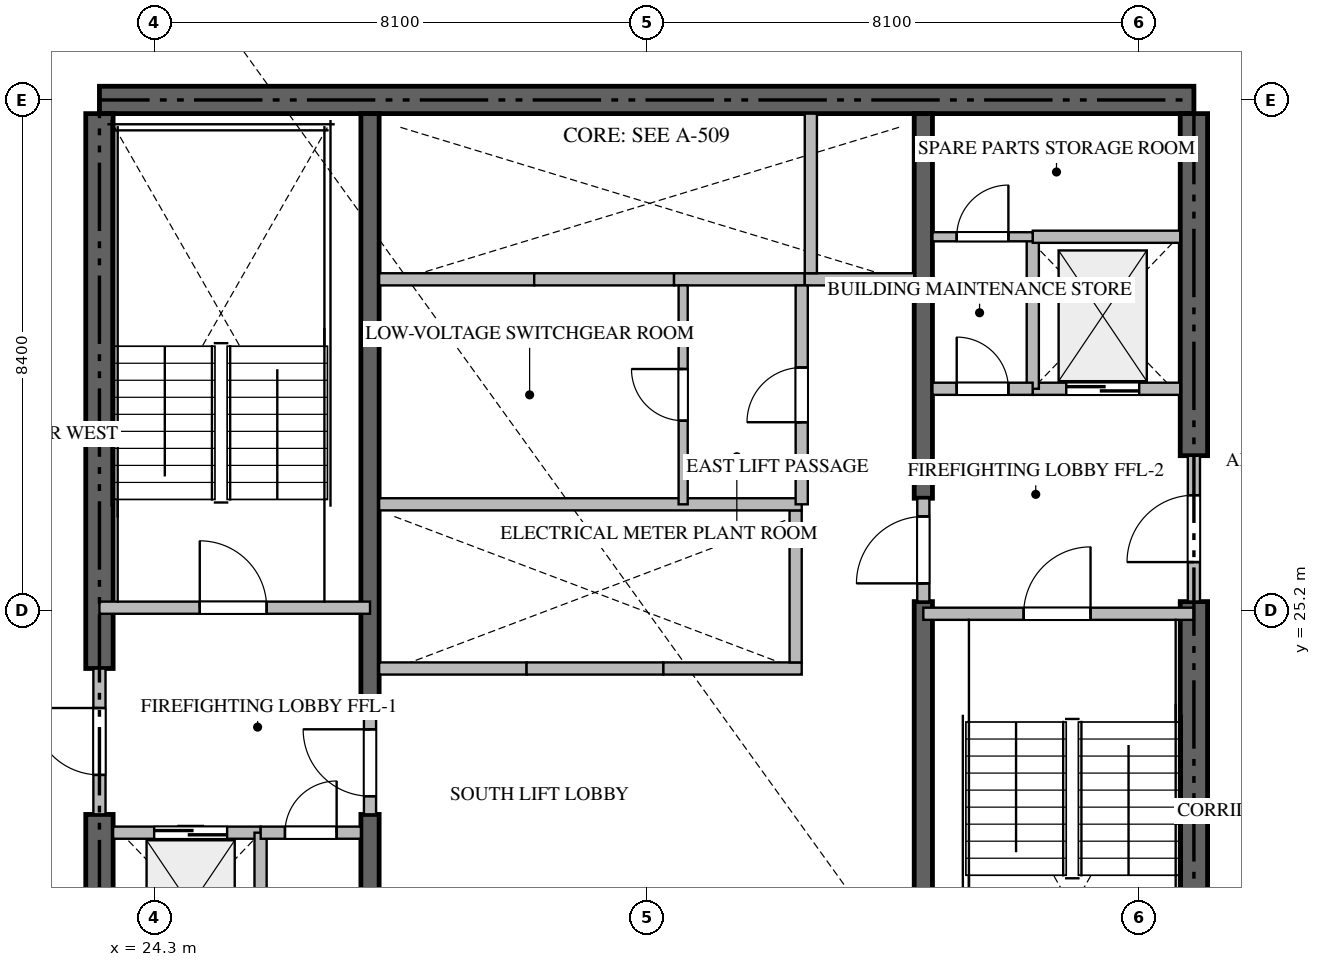
"""IFC4 building model, lengths in metres.
Left out: names, types, materials, properties, quantities, classifications, styles, units other than length and angle.
Written with IfcOpenShell. Run it as: python <this file> out.ifc"""

import sys

from ifc_helpers import new_model, si_unit, direction, frame, frame_2d, origin, place, context, subcontext, project, spatial, rectangle, extrude, source, transform, mapped, element, fill, save


model = new_model("IFC4")
c1 = context("Model", 3, precision=1e-05, world=origin(), true_north=direction((0.0, 1.0)))
c2 = subcontext(c1, "Body", "Model", "MODEL_VIEW")
j1 = project(units=[si_unit("LENGTHUNIT", "METRE"), si_unit("PLANEANGLEUNIT", "RADIAN")], contexts=[c1])
p1 = place(None, origin())
s1 = spatial("IfcSite", under=j1, at=p1, CompositionType="ELEMENT")
p2 = place(p1, origin())
s2 = spatial("IfcBuilding", under=s1, at=p2, CompositionType="ELEMENT")
p3 = place(p2, frame((0.0, 0.0, 64.2)))
s3 = spatial("IfcBuildingStorey", under=s2, at=p3, CompositionType="ELEMENT", Elevation=64.2)
p4 = place(p3, frame((41.4, 33.6, -0.26), z_axis=(0.0, 0.0, 1.0), x_axis=(-1.0, 0.0, 0.0)))
e1 = element("IfcWall", 1, at=p4, inside=s3, PredefinedType="SHEAR", context=c2, shape_type="SweptSolid", body=[
    extrude(rectangle(XDim=18.0, YDim=0.45, at=frame_2d((9.0, 0.0))), origin(), (0.0, 0.0, 1.0), 3.748),
])
p5 = place(p3, frame((23.4, 17.025, -0.26), z_axis=(0.0, 0.0, 1.0), x_axis=(0.0, 1.0, 0.0)))
e2 = element("IfcWall", 2, at=p5, inside=s3, PredefinedType="SHEAR", context=c2, shape_type="SweptSolid", body=[
    extrude(rectangle(XDim=4.825, YDim=0.45, at=frame_2d((2.413, 0.0))), origin(), (0.0, 0.0, 1.0), 3.748),
])
p6 = place(p3, frame((23.4, 24.25, -0.26), z_axis=(0.0, 0.0, 1.0), x_axis=(0.0, 1.0, 0.0)))
e3 = element("IfcWall", 3, at=p6, inside=s3, PredefinedType="SHEAR", context=c2, shape_type="SweptSolid", body=[
    extrude(rectangle(XDim=9.125, YDim=0.45, at=frame_2d((4.562, 0.0))), origin(), (0.0, 0.0, 1.0), 3.748),
])
p7 = place(p3, frame((41.4, 17.025, -0.26), z_axis=(0.0, 0.0, 1.0), x_axis=(0.0, 1.0, 0.0)))
e4 = element("IfcWall", 4, at=p7, inside=s3, PredefinedType="SHEAR", context=c2, shape_type="SweptSolid", body=[
    extrude(rectangle(XDim=8.325, YDim=0.45, at=frame_2d((4.163, 0.0))), origin(), (0.0, 0.0, 1.0), 3.748),
])
p8 = place(p3, frame((41.4, 27.75, -0.26), z_axis=(0.0, 0.0, 1.0), x_axis=(0.0, 1.0, 0.0)))
e5 = element("IfcWall", 5, at=p8, inside=s3, PredefinedType="SHEAR", context=c2, shape_type="SweptSolid", body=[
    extrude(rectangle(XDim=5.625, YDim=0.45, at=frame_2d((2.812, 0.0))), origin(), (0.0, 0.0, 1.0), 3.748),
])
p9 = place(p3, frame((27.85, 17.025, -0.26), z_axis=(0.0, 0.0, 1.0), x_axis=(0.0, 1.0, 0.0)))
e6 = element("IfcWall", 6, at=p9, inside=s3, PredefinedType="SHEAR", context=c2, shape_type="SweptSolid", body=[
    extrude(rectangle(XDim=4.825, YDim=0.3, at=frame_2d((2.413, 0.0))), origin(), (0.0, 0.0, 1.0), 3.748),
])
p10 = place(p3, frame((27.85, 23.55, -0.26), z_axis=(0.0, 0.0, 1.0), x_axis=(0.0, 1.0, 0.0)))
e7 = element("IfcWall", 7, at=p10, inside=s3, PredefinedType="SHEAR", context=c2, shape_type="SweptSolid", body=[
    extrude(rectangle(XDim=9.825, YDim=0.3, at=frame_2d((4.913, 0.0))), origin(), (0.0, 0.0, 1.0), 3.748),
])
p11 = place(p3, frame((36.95, 17.025, -0.26), z_axis=(0.0, 0.0, 1.0), x_axis=(0.0, 1.0, 0.0)))
e8 = element("IfcWall", 8, at=p11, inside=s3, PredefinedType="SHEAR", context=c2, shape_type="SweptSolid", body=[
    extrude(rectangle(XDim=8.325, YDim=0.3, at=frame_2d((4.163, 0.0))), origin(), (0.0, 0.0, 1.0), 3.748),
])
p12 = place(p3, frame((36.95, 27.05, -0.26), z_axis=(0.0, 0.0, 1.0), x_axis=(0.0, 1.0, 0.0)))
e9 = element("IfcWall", 9, at=p12, inside=s3, PredefinedType="SHEAR", context=c2, shape_type="SweptSolid", body=[
    extrude(rectangle(XDim=6.325, YDim=0.3, at=frame_2d((3.163, 0.0))), origin(), (0.0, 0.0, 1.0), 3.748),
])
p13 = place(p3, frame((23.4, 25.25, 0.0), z_axis=(0.0, 0.0, 1.0), x_axis=(1.0, 0.0, 0.0)))
e10 = element("IfcWall", 10, at=p13, inside=s3, PredefinedType="STANDARD", context=c2, shape_type="SweptSolid", body=[
    extrude(rectangle(XDim=4.45, YDim=0.2, at=frame_2d((2.225, 0.0))), origin(), (0.0, 0.0, 1.0), 3.49),
])
p14 = place(p13, frame((1.65, 0.0, 0.0)))
e11 = element("IfcOpeningElement", 11, at=p14, cuts=e10, PredefinedType="OPENING", context=c2, shape_type="SweptSolid", body=[
    extrude(rectangle(XDim=1.1, YDim=2.15, at=frame_2d((0.55, 1.075))), frame((0.0, 0.11, 0.0), z_axis=(0.0, -1.0, 0.0), x_axis=(1.0, 0.0, 0.0)), (0.0, 0.0, 1.0), 0.22),
])
p15 = place(p3, frame((36.95, 25.15, 0.0), z_axis=(0.0, 0.0, 1.0), x_axis=(1.0, 0.0, 0.0)))
e12 = element("IfcWall", 12, at=p15, inside=s3, PredefinedType="STANDARD", context=c2, shape_type="SweptSolid", body=[
    extrude(rectangle(XDim=4.45, YDim=0.2, at=frame_2d((2.225, 0.0))), origin(), (0.0, 0.0, 1.0), 3.49),
])
p16 = place(p15, frame((1.65, 0.0, 0.0)))
e13 = element("IfcOpeningElement", 13, at=p16, cuts=e12, PredefinedType="OPENING", context=c2, shape_type="SweptSolid", body=[
    extrude(rectangle(XDim=1.1, YDim=2.15, at=frame_2d((0.55, 1.075))), frame((0.0, 0.11, 0.0), z_axis=(0.0, -1.0, 0.0), x_axis=(1.0, 0.0, 0.0)), (0.0, 0.0, 1.0), 0.22),
])
p17 = place(p3, frame((23.625, 21.55, 0.0), z_axis=(0.0, 0.0, 1.0), x_axis=(1.0, 0.0, 0.0)))
e14 = element("IfcWall", 14, at=p17, inside=s3, PredefinedType="STANDARD", context=c2, shape_type="SweptSolid", body=[
    extrude(rectangle(XDim=2.425, YDim=0.2, at=frame_2d((1.212, 0.0))), origin(), (0.0, 0.0, 1.0), 3.49),
])
p18 = place(p17, frame((0.675, 0.0, 0.0)))
e15 = element("IfcOpeningElement", 15, at=p18, cuts=e14, PredefinedType="OPENING", context=c2, shape_type="SweptSolid", body=[
    extrude(rectangle(XDim=1.2, YDim=2.2, at=frame_2d((0.6, 1.1))), frame((0.0, 0.11, 0.0), z_axis=(0.0, -1.0, 0.0), x_axis=(1.0, 0.0, 0.0)), (0.0, 0.0, 1.0), 0.22),
])
p19 = place(p3, frame((38.75, 28.85, 0.0), z_axis=(0.0, 0.0, 1.0), x_axis=(1.0, 0.0, 0.0)))
e16 = element("IfcWall", 16, at=p19, inside=s3, PredefinedType="STANDARD", context=c2, shape_type="SweptSolid", body=[
    extrude(rectangle(XDim=2.425, YDim=0.2, at=frame_2d((1.212, 0.0))), origin(), (0.0, 0.0, 1.0), 3.49),
])
p20 = place(p19, frame((0.55, 0.0, 0.0)))
e17 = element("IfcOpeningElement", 17, at=p20, cuts=e16, PredefinedType="OPENING", context=c2, shape_type="SweptSolid", body=[
    extrude(rectangle(XDim=1.2, YDim=2.2, at=frame_2d((0.6, 1.1))), frame((0.0, 0.11, 0.0), z_axis=(0.0, -1.0, 0.0), x_axis=(1.0, 0.0, 0.0)), (0.0, 0.0, 1.0), 0.22),
])
p21 = place(p3, frame((28.0, 24.25, 0.0), z_axis=(0.0, 0.0, 1.0), x_axis=(1.0, 0.0, 0.0)))
e18 = element("IfcWall", 18, at=p21, inside=s3, PredefinedType="STANDARD", context=c2, shape_type="SweptSolid", body=[
    extrude(rectangle(XDim=2.425, YDim=0.2, at=frame_2d((1.212, 0.0))), origin(), (0.0, 0.0, 1.0), 3.49),
])
p22 = place(p3, frame((30.425, 24.25, 0.0), z_axis=(0.0, 0.0, 1.0), x_axis=(1.0, 0.0, 0.0)))
e19 = element("IfcWall", 19, at=p22, inside=s3, PredefinedType="STANDARD", context=c2, shape_type="SweptSolid", body=[
    extrude(rectangle(XDim=2.25, YDim=0.2, at=frame_2d((1.125, 0.0))), origin(), (0.0, 0.0, 1.0), 3.49),
])
p23 = place(p3, frame((32.675, 24.25, 0.0), z_axis=(0.0, 0.0, 1.0), x_axis=(1.0, 0.0, 0.0)))
e20 = element("IfcWall", 20, at=p23, inside=s3, PredefinedType="STANDARD", context=c2, shape_type="SweptSolid", body=[
    extrude(rectangle(XDim=2.275, YDim=0.2, at=frame_2d((1.137, 0.0))), origin(), (0.0, 0.0, 1.0), 3.49),
])
p24 = place(p3, frame((34.85, 24.35, 0.0), z_axis=(0.0, 0.0, 1.0), x_axis=(0.0, 1.0, 0.0)))
e21 = element("IfcWall", 21, at=p24, inside=s3, PredefinedType="STANDARD", context=c2, shape_type="SweptSolid", body=[
    extrude(rectangle(XDim=2.5, YDim=0.2, at=frame_2d((1.25, 0.0))), origin(), (0.0, 0.0, 1.0), 3.49),
])
p25 = place(p3, frame((28.0, 30.65, 0.0), z_axis=(0.0, 0.0, 1.0), x_axis=(1.0, 0.0, 0.0)))
e22 = element("IfcWall", 22, at=p25, inside=s3, PredefinedType="STANDARD", context=c2, shape_type="SweptSolid", body=[
    extrude(rectangle(XDim=2.55, YDim=0.2, at=frame_2d((1.275, 0.0))), origin(), (0.0, 0.0, 1.0), 3.49),
])
p26 = place(p3, frame((30.55, 30.65, 0.0), z_axis=(0.0, 0.0, 1.0), x_axis=(1.0, 0.0, 0.0)))
e23 = element("IfcWall", 23, at=p26, inside=s3, PredefinedType="STANDARD", context=c2, shape_type="SweptSolid", body=[
    extrude(rectangle(XDim=2.3, YDim=0.2, at=frame_2d((1.15, 0.0))), origin(), (0.0, 0.0, 1.0), 3.49),
])
p27 = place(p3, frame((32.85, 30.65, 0.0), z_axis=(0.0, 0.0, 1.0), x_axis=(1.0, 0.0, 0.0)))
e24 = element("IfcWall", 24, at=p27, inside=s3, PredefinedType="STANDARD", context=c2, shape_type="SweptSolid", body=[
    extrude(rectangle(XDim=2.15, YDim=0.2, at=frame_2d((1.075, 0.0))), origin(), (0.0, 0.0, 1.0), 3.49),
])
p28 = place(p3, frame((35.0, 30.65, 0.0), z_axis=(0.0, 0.0, 1.0), x_axis=(1.0, 0.0, 0.0)))
e25 = element("IfcWall", 25, at=p28, inside=s3, PredefinedType="STANDARD", context=c2, shape_type="SweptSolid", body=[
    extrude(rectangle(XDim=1.8, YDim=0.2, at=frame_2d((0.9, 0.0))), origin(), (0.0, 0.0, 1.0), 3.49),
])
p29 = place(p3, frame((35.1, 30.75, 0.0), z_axis=(0.0, 0.0, 1.0), x_axis=(0.0, 1.0, 0.0)))
e26 = element("IfcWall", 26, at=p29, inside=s3, PredefinedType="STANDARD", context=c2, shape_type="SweptSolid", body=[
    extrude(rectangle(XDim=2.625, YDim=0.2, at=frame_2d((1.312, 0.0))), origin(), (0.0, 0.0, 1.0), 3.49),
])
p30 = place(p3, frame((26.05, 19.05, 0.0), z_axis=(0.0, 0.0, 1.0), x_axis=(0.0, 1.0, 0.0)))
e27 = element("IfcWall", 27, at=p30, inside=s3, PredefinedType="STANDARD", context=c2, shape_type="SweptSolid", body=[
    extrude(rectangle(XDim=2.5, YDim=0.2, at=frame_2d((1.25, 0.0))), origin(), (0.0, 0.0, 1.0), 3.49),
])
p31 = place(p3, frame((26.052, 21.55, 0.0), z_axis=(0.0, 0.0, 1.0), x_axis=(1.0, 0.0, 0.0)))
e28 = element("IfcWall", 28, at=p31, inside=s3, PredefinedType="STANDARD", context=c2, shape_type="SweptSolid", body=[
    extrude(rectangle(XDim=1.648, YDim=0.2, at=frame_2d((0.824, 0.0))), origin(), (0.0, 0.0, 1.0), 3.49),
])
p32 = place(p31, frame((0.399, 0.0, 0.0)))
e29 = element("IfcOpeningElement", 29, at=p32, cuts=e28, PredefinedType="OPENING", context=c2, shape_type="SweptSolid", body=[
    extrude(rectangle(XDim=0.85, YDim=2.1, at=frame_2d((0.425, 1.05))), frame((0.0, 0.11, 0.0), z_axis=(0.0, -1.0, 0.0), x_axis=(1.0, 0.0, 0.0)), (0.0, 0.0, 1.0), 0.22),
])
p33 = place(p3, frame((38.75, 28.85, 0.0), z_axis=(0.0, 0.0, 1.0), x_axis=(0.0, 1.0, 0.0)))
e30 = element("IfcWall", 30, at=p33, inside=s3, PredefinedType="STANDARD", context=c2, shape_type="SweptSolid", body=[
    extrude(rectangle(XDim=2.5, YDim=0.2, at=frame_2d((1.25, 0.0))), origin(), (0.0, 0.0, 1.0), 3.49),
])
p34 = place(p3, frame((38.75, 31.35, 0.0), z_axis=(0.0, 0.0, 1.0), x_axis=(1.0, 0.0, 0.0)))
e31 = element("IfcWall", 31, at=p34, inside=s3, PredefinedType="STANDARD", context=c2, shape_type="SweptSolid", body=[
    extrude(rectangle(XDim=2.425, YDim=0.2, at=frame_2d((1.212, 0.0))), origin(), (0.0, 0.0, 1.0), 3.49),
])
p35 = place(p3, frame((37.1, 28.85, 0.0), z_axis=(0.0, 0.0, 1.0), x_axis=(1.0, 0.0, 0.0)))
e32 = element("IfcWall", 32, at=p35, inside=s3, PredefinedType="STANDARD", context=c2, shape_type="SweptSolid", body=[
    extrude(rectangle(XDim=1.648, YDim=0.2, at=frame_2d((0.824, 0.0))), origin(), (0.0, 0.0, 1.0), 3.49),
])
p36 = place(p35, frame((0.399, 0.0, 0.0)))
e33 = element("IfcOpeningElement", 33, at=p36, cuts=e32, PredefinedType="OPENING", context=c2, shape_type="SweptSolid", body=[
    extrude(rectangle(XDim=0.85, YDim=2.1, at=frame_2d((0.425, 1.05))), frame((0.0, 0.11, 0.0), z_axis=(0.0, -1.0, 0.0), x_axis=(1.0, 0.0, 0.0)), (0.0, 0.0, 1.0), 0.22),
])
p37 = place(p3, frame((23.4, 21.852, 0.0), z_axis=(0.0, 0.0, 1.0), x_axis=(0.0, 1.0, 0.0)))
e34 = element("IfcWall", 34, at=p37, inside=s3, PredefinedType="STANDARD", context=c2, shape_type="SweptSolid", body=[
    extrude(rectangle(XDim=2.396, YDim=0.2, at=frame_2d((1.198, 0.0))), origin(), (0.0, 0.0, 1.0), 3.49),
])
p38 = place(p37, frame((0.648, 0.0, 0.0)))
e35 = element("IfcOpeningElement", 35, at=p38, cuts=e34, PredefinedType="OPENING", context=c2, shape_type="SweptSolid", body=[
    extrude(rectangle(XDim=1.1, YDim=2.15, at=frame_2d((0.55, 1.075))), frame((0.0, 0.11, 0.0), z_axis=(0.0, -1.0, 0.0), x_axis=(1.0, 0.0, 0.0)), (0.0, 0.0, 1.0), 0.22),
])
p39 = place(p3, frame((41.4, 25.352, 0.0), z_axis=(0.0, 0.0, 1.0), x_axis=(0.0, 1.0, 0.0)))
e36 = element("IfcWall", 36, at=p39, inside=s3, PredefinedType="STANDARD", context=c2, shape_type="SweptSolid", body=[
    extrude(rectangle(XDim=2.396, YDim=0.2, at=frame_2d((1.198, 0.0))), origin(), (0.0, 0.0, 1.0), 3.49),
])
p40 = place(p39, frame((0.648, 0.0, 0.0)))
e37 = element("IfcOpeningElement", 37, at=p40, cuts=e36, PredefinedType="OPENING", context=c2, shape_type="SweptSolid", body=[
    extrude(rectangle(XDim=1.1, YDim=2.15, at=frame_2d((0.55, 1.075))), frame((0.0, 0.11, 0.0), z_axis=(0.0, -1.0, 0.0), x_axis=(1.0, 0.0, 0.0)), (0.0, 0.0, 1.0), 0.22),
])
p41 = place(p3, frame((27.85, 21.852, 0.0), z_axis=(0.0, 0.0, 1.0), x_axis=(0.0, 1.0, 0.0)))
e38 = element("IfcWall", 38, at=p41, inside=s3, PredefinedType="STANDARD", context=c2, shape_type="SweptSolid", body=[
    extrude(rectangle(XDim=1.696, YDim=0.2, at=frame_2d((0.848, 0.0))), origin(), (0.0, 0.0, 1.0), 3.49),
])
p42 = place(p41, frame((0.298, 0.0, 0.0)))
e39 = element("IfcOpeningElement", 39, at=p42, cuts=e38, PredefinedType="OPENING", context=c2, shape_type="SweptSolid", body=[
    extrude(rectangle(XDim=1.1, YDim=2.15, at=frame_2d((0.55, 1.075))), frame((0.0, 0.11, 0.0), z_axis=(0.0, -1.0, 0.0), x_axis=(1.0, 0.0, 0.0)), (0.0, 0.0, 1.0), 0.22),
])
p43 = place(p3, frame((36.95, 25.352, 0.0), z_axis=(0.0, 0.0, 1.0), x_axis=(0.0, 1.0, 0.0)))
e40 = element("IfcWall", 40, at=p43, inside=s3, PredefinedType="STANDARD", context=c2, shape_type="SweptSolid", body=[
    extrude(rectangle(XDim=1.696, YDim=0.2, at=frame_2d((0.848, 0.0))), origin(), (0.0, 0.0, 1.0), 3.49),
])
p44 = place(p43, frame((0.298, 0.0, 0.0)))
e41 = element("IfcOpeningElement", 41, at=p44, cuts=e40, PredefinedType="OPENING", context=c2, shape_type="SweptSolid", body=[
    extrude(rectangle(XDim=1.1, YDim=2.15, at=frame_2d((0.55, 1.075))), frame((0.0, 0.11, 0.0), z_axis=(0.0, -1.0, 0.0), x_axis=(1.0, 0.0, 0.0)), (0.0, 0.0, 1.0), 0.22),
])
p45 = place(p3, frame((28.0, 26.95, 0.0), z_axis=(0.0, 0.0, 1.0), x_axis=(1.0, 0.0, 0.0)))
e42 = element("IfcWall", 42, at=p45, inside=s3, PredefinedType="STANDARD", context=c2, shape_type="SweptSolid", body=[
    extrude(rectangle(XDim=6.95, YDim=0.2, at=frame_2d((3.475, 0.0))), origin(), (0.0, 0.0, 1.0), 3.49),
])
p46 = place(p3, frame((37.1, 31.35, 0.0), z_axis=(0.0, 0.0, 1.0), x_axis=(1.0, 0.0, 0.0)))
e43 = element("IfcWall", 43, at=p46, inside=s3, PredefinedType="PARTITIONING", context=c2, shape_type="SweptSolid", body=[
    extrude(rectangle(XDim=1.648, YDim=0.15, at=frame_2d((0.824, 0.0))), origin(), (0.0, 0.0, 1.0), 3.49),
])
p47 = place(p46, frame((0.399, 0.0, 0.0)))
e44 = element("IfcOpeningElement", 44, at=p47, cuts=e43, PredefinedType="OPENING", context=c2, shape_type="SweptSolid", body=[
    extrude(rectangle(XDim=0.85, YDim=2.1, at=frame_2d((0.425, 1.05))), frame((0.0, 0.085, 0.0), z_axis=(0.0, -1.0, 0.0), x_axis=(1.0, 0.0, 0.0)), (0.0, 0.0, 1.0), 0.17),
])
p48 = place(p3, frame((34.95, 26.95, 0.0), z_axis=(0.0, 0.0, 1.0), x_axis=(0.0, 1.0, 0.0)))
e45 = element("IfcWall", 45, at=p48, inside=s3, PredefinedType="STANDARD", context=c2, shape_type="SweptSolid", body=[
    extrude(rectangle(XDim=3.6, YDim=0.2, at=frame_2d((1.8, 0.0))), origin(), (0.0, 0.0, 1.0), 3.49),
])
p49 = place(p48, frame((1.35, 0.0, 0.0)))
e46 = element("IfcOpeningElement", 46, at=p49, cuts=e45, PredefinedType="OPENING", context=c2, shape_type="SweptSolid", body=[
    extrude(rectangle(XDim=0.9, YDim=2.1, at=frame_2d((0.45, 1.05))), frame((0.0, 0.11, 0.0), z_axis=(0.0, -1.0, 0.0), x_axis=(1.0, 0.0, 0.0)), (0.0, 0.0, 1.0), 0.22),
])
p50 = place(p3, frame((33.0, 26.95, 0.0), z_axis=(0.0, 0.0, 1.0), x_axis=(0.0, 1.0, 0.0)))
e47 = element("IfcWall", 47, at=p50, inside=s3, PredefinedType="PARTITIONING", context=c2, shape_type="SweptSolid", body=[
    extrude(rectangle(XDim=3.6, YDim=0.15, at=frame_2d((1.8, 0.0))), origin(), (0.0, 0.0, 1.0), 3.49),
])
p51 = place(p50, frame((1.375, 0.0, 0.0)))
e48 = element("IfcOpeningElement", 48, at=p51, cuts=e47, PredefinedType="OPENING", context=c2, shape_type="SweptSolid", body=[
    extrude(rectangle(XDim=0.85, YDim=2.1, at=frame_2d((0.425, 1.05))), frame((0.0, 0.085, 0.0), z_axis=(0.0, -1.0, 0.0), x_axis=(1.0, 0.0, 0.0)), (0.0, 0.0, 1.0), 0.17),
])
m1 = source(origin(), c2, "Body", "SweptSolid", [
    extrude(rectangle(XDim=1.1, YDim=2.15, at=frame_2d((0.55, 1.075))), frame((0.0, 0.025, 0.0), z_axis=(0.0, -1.0, 0.0), x_axis=(1.0, 0.0, 0.0)), (0.0, 0.0, 1.0), 0.05),
])
p52 = place(p14, origin())
e49 = element("IfcDoor", 49, at=p52, inside=s3, OperationType="SINGLE_SWING_LEFT", PredefinedType="DOOR", context=c2, shape_type="MappedRepresentation", body=[
    mapped(m1, transform((0.0, 0.0, 0.0), scale=1.0)),
])
fill(e11, e49)
p53 = place(p16, origin())
e50 = element("IfcDoor", 50, at=p53, inside=s3, OperationType="SINGLE_SWING_RIGHT", PredefinedType="DOOR", context=c2, shape_type="MappedRepresentation", body=[
    mapped(m1, transform((0.0, 0.0, 0.0), scale=1.0)),
])
fill(e13, e50)
m2 = source(origin(), c2, "Body", "SweptSolid", [
    extrude(rectangle(XDim=1.2, YDim=2.2, at=frame_2d((0.6, 1.1))), frame((0.0, 0.025, 0.0), z_axis=(0.0, -1.0, 0.0), x_axis=(1.0, 0.0, 0.0)), (0.0, 0.0, 1.0), 0.05),
])
p54 = place(p18, origin())
e51 = element("IfcDoor", 51, at=p54, inside=s3, OperationType="DOUBLE_DOOR_SLIDING", PredefinedType="DOOR", context=c2, shape_type="MappedRepresentation", body=[
    mapped(m2, transform((0.0, 0.0, 0.0), scale=1.0)),
])
fill(e15, e51)
p55 = place(p20, origin())
e52 = element("IfcDoor", 52, at=p55, inside=s3, OperationType="DOUBLE_DOOR_SLIDING", PredefinedType="DOOR", context=c2, shape_type="MappedRepresentation", body=[
    mapped(m2, transform((0.0, 0.0, 0.0), scale=1.0)),
])
fill(e17, e52)
m3 = source(origin(), c2, "Body", "SweptSolid", [
    extrude(rectangle(XDim=0.85, YDim=2.1, at=frame_2d((0.425, 1.05))), frame((0.0, 0.025, 0.0), z_axis=(0.0, -1.0, 0.0), x_axis=(1.0, 0.0, 0.0)), (0.0, 0.0, 1.0), 0.05),
])
p56 = place(p32, origin())
e53 = element("IfcDoor", 53, at=p56, inside=s3, OperationType="SINGLE_SWING_RIGHT", PredefinedType="DOOR", context=c2, shape_type="MappedRepresentation", body=[
    mapped(m3, transform((0.0, 0.0, 0.0), scale=1.0)),
])
fill(e29, e53)
p57 = place(p36, origin())
e54 = element("IfcDoor", 54, at=p57, inside=s3, OperationType="SINGLE_SWING_LEFT", PredefinedType="DOOR", context=c2, shape_type="MappedRepresentation", body=[
    mapped(m3, transform((0.0, 0.0, 0.0), scale=1.0)),
])
fill(e33, e54)
p58 = place(p38, origin())
e55 = element("IfcDoor", 55, at=p58, inside=s3, OperationType="SINGLE_SWING_RIGHT", PredefinedType="DOOR", context=c2, shape_type="MappedRepresentation", body=[
    mapped(m1, transform((0.0, 0.0, 0.0), scale=1.0)),
])
fill(e35, e55)
p59 = place(p40, origin())
e56 = element("IfcDoor", 56, at=p59, inside=s3, OperationType="SINGLE_SWING_LEFT", PredefinedType="DOOR", context=c2, shape_type="MappedRepresentation", body=[
    mapped(m1, transform((0.0, 0.0, 0.0), scale=1.0)),
])
fill(e37, e56)
p60 = place(p42, origin())
e57 = element("IfcDoor", 57, at=p60, inside=s3, OperationType="SINGLE_SWING_RIGHT", PredefinedType="DOOR", context=c2, shape_type="MappedRepresentation", body=[
    mapped(m1, transform((0.0, 0.0, 0.0), scale=1.0)),
])
fill(e39, e57)
p61 = place(p44, origin())
e58 = element("IfcDoor", 58, at=p61, inside=s3, OperationType="SINGLE_SWING_LEFT", PredefinedType="DOOR", context=c2, shape_type="MappedRepresentation", body=[
    mapped(m1, transform((0.0, 0.0, 0.0), scale=1.0)),
])
fill(e41, e58)
p62 = place(p47, origin())
e59 = element("IfcDoor", 59, at=p62, inside=s3, OperationType="SINGLE_SWING_RIGHT", PredefinedType="DOOR", context=c2, shape_type="MappedRepresentation", body=[
    mapped(m3, transform((0.0, 0.0, 0.0), scale=1.0)),
])
fill(e44, e59)
m4 = source(origin(), c2, "Body", "SweptSolid", [
    extrude(rectangle(XDim=0.9, YDim=2.1, at=frame_2d((0.45, 1.05))), frame((0.0, 0.025, 0.0), z_axis=(0.0, -1.0, 0.0), x_axis=(1.0, 0.0, 0.0)), (0.0, 0.0, 1.0), 0.05),
])
p63 = place(p49, origin())
e60 = element("IfcDoor", 60, at=p63, inside=s3, OperationType="SINGLE_SWING_LEFT", PredefinedType="DOOR", context=c2, shape_type="MappedRepresentation", body=[
    mapped(m4, transform((0.0, 0.0, 0.0), scale=1.0)),
])
fill(e46, e60)
p64 = place(p51, origin())
e61 = element("IfcDoor", 61, at=p64, inside=s3, OperationType="SINGLE_SWING_RIGHT", PredefinedType="DOOR", context=c2, shape_type="MappedRepresentation", body=[
    mapped(m3, transform((0.0, 0.0, 0.0), scale=1.0)),
])
fill(e48, e61)
save(model, sys.argv[1])
